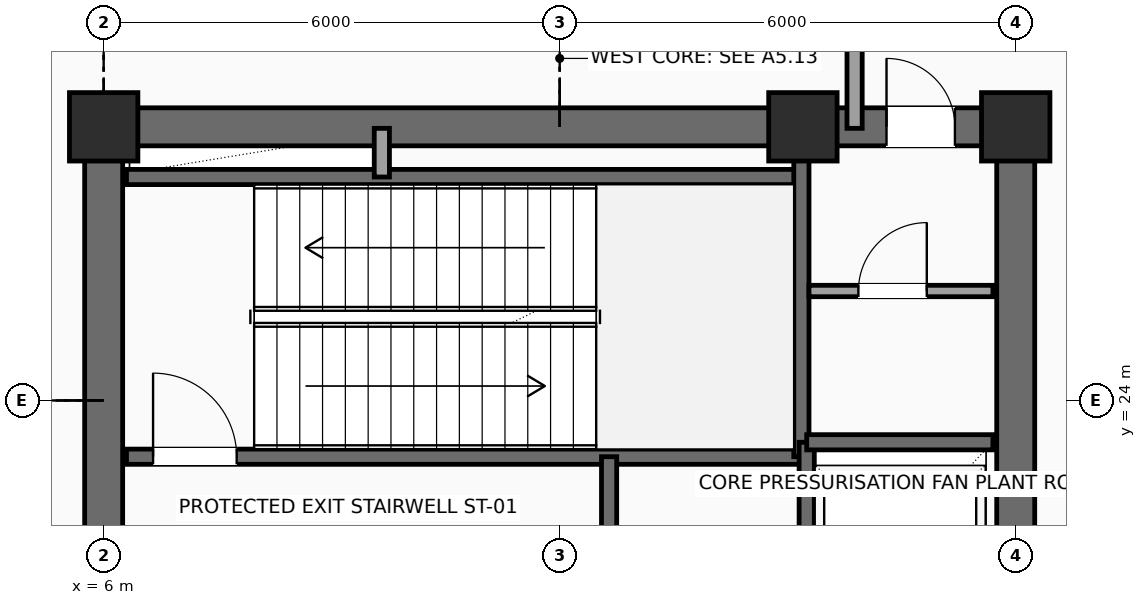
"""IFC4 building model, lengths in metres.
Left out: names, types, materials, properties, quantities, classifications, styles, units other than length and angle.
Written with IfcOpenShell. Run it as: python <this file> out.ifc"""

import sys

from ifc_helpers import new_model, si_unit, direction, frame, frame_2d, origin, origin_2d, place, context, subcontext, project, spatial, rectangle, extrude, element, fill, save


model = new_model("IFC4")
c1 = context("Model", 3, precision=1e-05, world=origin(), true_north=direction((0.0, 1.0)))
c2 = subcontext(c1, "Body", "Model", "MODEL_VIEW")
j1 = project(units=[si_unit("LENGTHUNIT", "METRE"), si_unit("PLANEANGLEUNIT", "RADIAN")], contexts=[c1])
p1 = place(None, origin())
s1 = spatial("IfcSite", under=j1, at=p1, CompositionType="ELEMENT")
p2 = place(p1, origin())
s2 = spatial("IfcBuilding", under=s1, at=p2, CompositionType="ELEMENT")
p3 = place(p2, frame((0.0, 0.0, 234.9)))
s3 = spatial("IfcBuildingStorey", under=s2, at=p3, CompositionType="ELEMENT", Elevation=234.9)
for number, where, z_axis, x_axis in (
    (1, (6.0, 27.6, 0.0), (0.0, 0.0, 1.0), (1.0, 0.0, 0.0)),
    (2, (15.2, 27.6, 0.0), (0.0, 0.0, 1.0), (1.0, 0.0, 0.0)),
    (3, (18.0, 27.6, 0.0), (0.0, 0.0, 1.0), (1.0, 0.0, 0.0)),
):
    element("IfcColumn", number, at=place(p3, frame(where, z_axis=z_axis, x_axis=x_axis)), inside=s3, PredefinedType="COLUMN", context=c2, shape_type="SweptSolid", body=[
        extrude(rectangle(XDim=0.9, YDim=0.9, at=origin_2d()), origin(), (0.0, 0.0, 1.0), 4.8),
    ])
p4 = place(p3, frame((6.0, 27.6, 0.0), z_axis=(0.0, 0.0, 1.0), x_axis=(1.0, 0.0, 0.0)))
e4 = element("IfcWall", 4, at=p4, inside=s3, PredefinedType="SHEAR", context=c2, shape_type="SweptSolid", body=[
    extrude(rectangle(XDim=12.0, YDim=0.5, at=frame_2d((6.0, 0.0))), origin(), (0.0, 0.0, 1.0), 4.6),
])
p5 = place(p4, frame((10.3, 0.0, 0.0)))
e5 = element("IfcOpeningElement", 5, at=p5, cuts=e4, PredefinedType="OPENING", context=c2, shape_type="SweptSolid", body=[
    extrude(rectangle(XDim=0.9, YDim=2.15, at=frame_2d((0.45, 1.075))), frame((0.0, 0.26, 0.0), z_axis=(0.0, -1.0, 0.0), x_axis=(1.0, 0.0, 0.0)), (0.0, 0.0, 1.0), 0.52),
])
for number, where, z_axis, x_axis in (
    (6, (6.0, 18.0, 0.0), (0.0, 0.0, 1.0), (0.0, 1.0, 0.0)),
    (7, (18.0, 18.0, 0.0), (0.0, 0.0, 1.0), (0.0, 1.0, 0.0)),
):
    element("IfcWall", number, at=place(p3, frame(where, z_axis=z_axis, x_axis=x_axis)), inside=s3, PredefinedType="SHEAR", context=c2, shape_type="SweptSolid", body=[
        extrude(rectangle(XDim=9.6, YDim=0.5, at=frame_2d((4.8, 0.0))), origin(), (0.0, 0.0, 1.0), 4.6),
    ])
p6 = place(p3, frame((6.3, 23.26, 0.0), z_axis=(0.0, 0.0, 1.0), x_axis=(1.0, 0.0, 0.0)))
e8 = element("IfcWall", 8, at=p6, inside=s3, PredefinedType="SHEAR", context=c2, shape_type="SweptSolid", body=[
    extrude(rectangle(XDim=8.88, YDim=0.2, at=frame_2d((4.44, 0.0))), origin(), (0.0, 0.0, 1.0), 4.6),
])
p7 = place(p6, frame((0.35, 0.0, 0.0)))
e9 = element("IfcOpeningElement", 9, at=p7, cuts=e8, PredefinedType="OPENING", context=c2, shape_type="SweptSolid", body=[
    extrude(rectangle(XDim=1.1, YDim=2.2, at=frame_2d((0.55, 1.1))), frame((0.0, 0.11, 0.0), z_axis=(0.0, -1.0, 0.0), x_axis=(1.0, 0.0, 0.0)), (0.0, 0.0, 1.0), 0.22),
])
p8 = place(p3, frame((6.3, 26.94, 0.0), z_axis=(0.0, 0.0, 1.0), x_axis=(1.0, 0.0, 0.0)))
e10 = element("IfcWall", 10, at=p8, inside=s3, PredefinedType="SHEAR", context=c2, shape_type="SweptSolid", body=[
    extrude(rectangle(XDim=8.88, YDim=0.2, at=frame_2d((4.44, 0.0))), origin(), (0.0, 0.0, 1.0), 4.6),
])
p9 = place(p3, frame((15.18, 23.26, 0.0), z_axis=(0.0, 0.0, 1.0), x_axis=(0.0, 1.0, 0.0)))
e11 = element("IfcWall", 11, at=p9, inside=s3, PredefinedType="SHEAR", context=c2, shape_type="SweptSolid", body=[
    extrude(rectangle(XDim=4.04, YDim=0.2, at=frame_2d((2.02, 0.0))), origin(), (0.0, 0.0, 1.0), 4.6),
])
p10 = place(p3, frame((12.65, 20.42, 0.0), z_axis=(0.0, 0.0, 1.0), x_axis=(0.0, 1.0, 0.0)))
e12 = element("IfcWall", 12, at=p10, inside=s3, PredefinedType="SHEAR", context=c2, shape_type="SweptSolid", body=[
    extrude(rectangle(XDim=2.84, YDim=0.2, at=frame_2d((1.42, 0.0))), origin(), (0.0, 0.0, 1.0), 4.6),
])
p11 = place(p10, frame((0.9, 0.0, 0.0)))
e13 = element("IfcOpeningElement", 13, at=p11, cuts=e12, PredefinedType="OPENING", context=c2, shape_type="SweptSolid", body=[
    extrude(rectangle(XDim=0.9, YDim=2.15, at=frame_2d((0.45, 1.075))), frame((0.0, 0.11, 0.0), z_axis=(0.0, -1.0, 0.0), x_axis=(1.0, 0.0, 0.0)), (0.0, 0.0, 1.0), 0.22),
])
p12 = place(p3, frame((9.66, 26.94, 0.0), z_axis=(0.0, 0.0, 1.0), x_axis=(0.0, 1.0, 0.0)))
e14 = element("IfcWall", 14, at=p12, inside=s3, PredefinedType="SOLIDWALL", context=c2, shape_type="SweptSolid", body=[
    extrude(rectangle(XDim=0.64, YDim=0.2, at=frame_2d((0.32, 0.0))), origin(), (0.0, 0.0, 1.0), 4.6),
])
p13 = place(p3, frame((15.25, 18.25, 0.0), z_axis=(0.0, 0.0, 1.0), x_axis=(0.0, 1.0, 0.0)))
e15 = element("IfcWall", 15, at=p13, inside=s3, PredefinedType="SHEAR", context=c2, shape_type="SweptSolid", body=[
    extrude(rectangle(XDim=5.2, YDim=0.2, at=frame_2d((2.6, 0.0))), origin(), (0.0, 0.0, 1.0), 4.6),
])
p14 = place(p3, frame((15.25, 23.45, 0.0), z_axis=(0.0, 0.0, 1.0), x_axis=(1.0, 0.0, 0.0)))
e16 = element("IfcWall", 16, at=p14, inside=s3, PredefinedType="SHEAR", context=c2, shape_type="SweptSolid", body=[
    extrude(rectangle(XDim=2.45, YDim=0.2, at=frame_2d((1.225, 0.0))), origin(), (0.0, 0.0, 1.0), 4.6),
])
p15 = place(p3, frame((15.28, 25.44, 0.0), z_axis=(0.0, 0.0, 1.0), x_axis=(1.0, 0.0, 0.0)))
e17 = element("IfcWall", 17, at=p15, inside=s3, PredefinedType="PARTITIONING", context=c2, shape_type="SweptSolid", body=[
    extrude(rectangle(XDim=2.42, YDim=0.15, at=frame_2d((1.21, 0.0))), origin(), (0.0, 0.0, 1.0), 4.6),
])
p16 = place(p15, frame((0.65, 0.0, 0.0)))
e18 = element("IfcOpeningElement", 18, at=p16, cuts=e17, PredefinedType="OPENING", context=c2, shape_type="SweptSolid", body=[
    extrude(rectangle(XDim=0.9, YDim=2.15, at=frame_2d((0.45, 1.075))), frame((0.0, 0.085, 0.0), z_axis=(0.0, -1.0, 0.0), x_axis=(1.0, 0.0, 0.0)), (0.0, 0.0, 1.0), 0.17),
])
p17 = place(p3, frame((15.88, 27.58, 0.0), z_axis=(0.0, 0.0, 1.0), x_axis=(0.0, 1.0, 0.0)))
e19 = element("IfcWall", 19, at=p17, inside=s3, PredefinedType="SOLIDWALL", context=c2, shape_type="SweptSolid", body=[
    extrude(rectangle(XDim=2.52, YDim=0.2, at=frame_2d((1.26, 0.0))), origin(), (0.0, 0.0, 1.0), 4.6),
])
p18 = place(p5, origin())
e20 = element("IfcDoor", 20, at=p18, inside=s3, OperationType="SINGLE_SWING_LEFT", PredefinedType="DOOR", context=c2, shape_type="SweptSolid", body=[
    extrude(rectangle(XDim=0.9, YDim=2.15, at=frame_2d((0.45, 1.075))), frame((0.0, 0.025, 0.0), z_axis=(0.0, -1.0, 0.0), x_axis=(1.0, 0.0, 0.0)), (0.0, 0.0, 1.0), 0.05),
])
fill(e5, e20)
p19 = place(p7, origin())
e21 = element("IfcDoor", 21, at=p19, inside=s3, OperationType="SINGLE_SWING_LEFT", PredefinedType="DOOR", context=c2, shape_type="SweptSolid", body=[
    extrude(rectangle(XDim=1.1, YDim=2.2, at=frame_2d((0.55, 1.1))), frame((0.0, 0.025, 0.0), z_axis=(0.0, -1.0, 0.0), x_axis=(1.0, 0.0, 0.0)), (0.0, 0.0, 1.0), 0.05),
])
fill(e9, e21)
p20 = place(p16, origin())
e22 = element("IfcDoor", 22, at=p20, inside=s3, OperationType="SINGLE_SWING_RIGHT", PredefinedType="DOOR", context=c2, shape_type="SweptSolid", body=[
    extrude(rectangle(XDim=0.9, YDim=2.15, at=frame_2d((0.45, 1.075))), frame((0.0, 0.025, 0.0), z_axis=(0.0, -1.0, 0.0), x_axis=(1.0, 0.0, 0.0)), (0.0, 0.0, 1.0), 0.05),
])
fill(e18, e22)
save(model, sys.argv[1])
